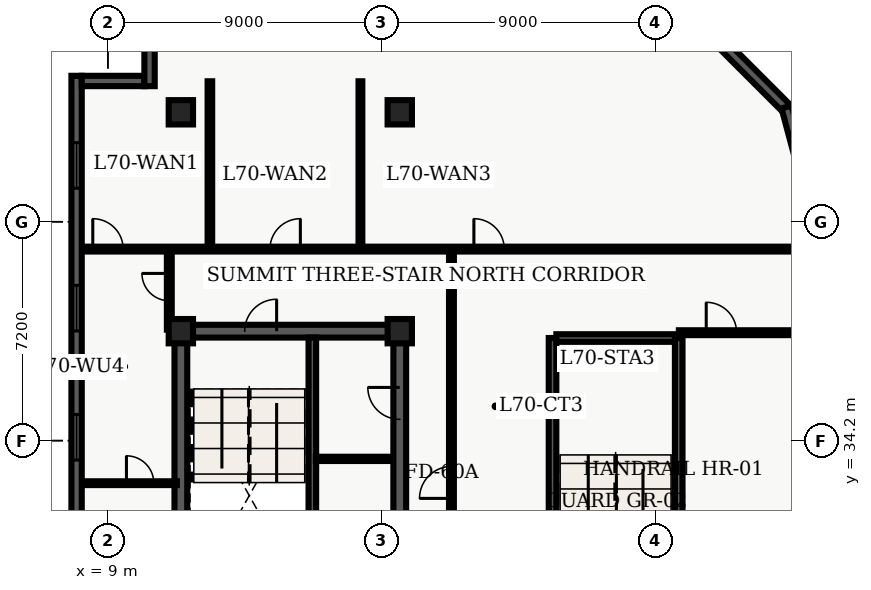
"""IFC4 building model, lengths in metres.
Left out: names, types, materials, properties, quantities, classifications, styles, units other than length and angle.
Written with IfcOpenShell. Run it as: python <this file> out.ifc"""

import sys

from ifc_helpers import new_model, entity, si_unit, converted_unit, direction, frame, origin_with_axes, origin_2d_with_axis, place, context, subcontext, project, spatial, polyline, rectangle, outline, extrude, element, fill, save


model = new_model("IFC4")
c1 = context("Model", 3, precision=1e-05, world=origin_with_axes(), true_north=direction((0.0, 1.0)))
c2 = subcontext(c1, "Body", "Model", "MODEL_VIEW")
j1 = project(units=[si_unit("LENGTHUNIT", "METRE"), converted_unit("PLANEANGLEUNIT", "DEGREE", entity("IfcPlaneAngleMeasure", 0.017), si_unit("PLANEANGLEUNIT", "RADIAN"), dimensions=[0, 0, 0, 0, 0, 0, 0])], contexts=[c1])
p1 = place(None, origin_with_axes())
s1 = spatial("IfcSite", under=j1, at=p1, CompositionType="ELEMENT")
p2 = place(p1, origin_with_axes())
s2 = spatial("IfcBuilding", under=s1, at=p2, CompositionType="ELEMENT")
p3 = place(p2, frame((0.0, 0.0, 284.1), z_axis=(0.0, 0.0, 1.0), x_axis=(1.0, 0.0, 0.0)))
s3 = spatial("IfcBuildingStorey", under=s2, at=p3, CompositionType="ELEMENT", Elevation=284.1)
p4 = place(p3, frame((11.4, 10.8, 0.0), z_axis=(0.0, 0.0, 1.0), x_axis=(0.0, 1.0, 0.0)))
e1 = element("IfcWall", 1, at=p4, inside=s3, PredefinedType="SHEAR", context=c2, shape_type="SweptSolid", body=[
    extrude(outline(polyline([(0.0, -0.21), (27.0, -0.21), (27.0, 0.21), (0.0, 0.21), (0.0, -0.21)])), origin_with_axes(), (0.0, 0.0, 1.0), 3.6),
])
p5 = place(p3, frame((11.4, 37.8, 0.0), z_axis=(0.0, 0.0, 1.0), x_axis=(1.0, 0.0, 0.0)))
e2 = element("IfcWall", 2, at=p5, inside=s3, PredefinedType="SHEAR", context=c2, shape_type="SweptSolid", body=[
    extrude(outline(polyline([(0.0, -0.21), (7.2, -0.21), (7.2, 0.21), (0.0, 0.21), (0.0, -0.21)])), origin_with_axes(), (0.0, 0.0, 1.0), 3.6),
])
p6 = place(p5, frame((2.625, 0.0, 0.0), z_axis=(0.0, 0.0, 1.0), x_axis=(1.0, 0.0, 0.0)))
e3 = element("IfcOpeningElement", 3, at=p6, cuts=e2, PredefinedType="OPENING", context=c2, shape_type="SweptSolid", body=[
    extrude(rectangle(XDim=1.05, YDim=0.44, at=origin_2d_with_axis()), origin_with_axes(), (0.0, 0.0, 1.0), 2.15),
])
p7 = place(p3, frame((18.6, 24.3, 0.0), z_axis=(0.0, 0.0, 1.0), x_axis=(0.0, 1.0, 0.0)))
e4 = element("IfcWall", 4, at=p7, inside=s3, PredefinedType="SHEAR", context=c2, shape_type="SweptSolid", body=[
    extrude(outline(polyline([(0.0, -0.21), (13.5, -0.21), (13.5, 0.21), (0.0, 0.21), (0.0, -0.21)])), origin_with_axes(), (0.0, 0.0, 1.0), 3.6),
])
p8 = place(p7, frame((6.725, 0.0, 0.0), z_axis=(0.0, 0.0, 1.0), x_axis=(1.0, 0.0, 0.0)))
e5 = element("IfcOpeningElement", 5, at=p8, cuts=e4, PredefinedType="OPENING", context=c2, shape_type="SweptSolid", body=[
    extrude(rectangle(XDim=1.05, YDim=0.44, at=origin_2d_with_axis()), origin_with_axes(), (0.0, 0.0, 1.0), 2.15),
])
p9 = place(p7, frame((11.125, 0.0, 0.0), z_axis=(0.0, 0.0, 1.0), x_axis=(1.0, 0.0, 0.0)))
e6 = element("IfcOpeningElement", 6, at=p9, cuts=e4, PredefinedType="OPENING", context=c2, shape_type="SweptSolid", body=[
    extrude(rectangle(XDim=1.05, YDim=0.44, at=origin_2d_with_axis()), origin_with_axes(), (0.0, 0.0, 1.0), 2.15),
])
p10 = place(p3, frame((15.725, 28.9, 0.0), z_axis=(0.0, 0.0, 1.0), x_axis=(0.0, 1.0, 0.0)))
e7 = element("IfcWall", 7, at=p10, inside=s3, PredefinedType="SHEAR", context=c2, shape_type="SweptSolid", body=[
    extrude(outline(polyline([(0.0, -0.125), (8.69, -0.125), (8.69, 0.125), (0.0, 0.125), (0.0, -0.125)])), origin_with_axes(), (0.0, 0.0, 1.0), 3.6),
])
p11 = place(p3, frame((23.625, 28.925, 0.0), z_axis=(0.0, 0.0, 1.0), x_axis=(0.0, 1.0, 0.0)))
e8 = element("IfcWall", 8, at=p11, inside=s3, PredefinedType="SHEAR", context=c2, shape_type="SweptSolid", body=[
    extrude(outline(polyline([(0.0, -0.125), (8.65, -0.125), (8.65, 0.125), (0.0, 0.125), (0.0, -0.125)])), origin_with_axes(), (0.0, 0.0, 1.0), 3.6),
])
p12 = place(p11, frame((0.975, 0.0, 0.0), z_axis=(0.0, 0.0, 1.0), x_axis=(1.0, 0.0, 0.0)))
e9 = element("IfcOpeningElement", 9, at=p12, cuts=e8, PredefinedType="OPENING", context=c2, shape_type="SweptSolid", body=[
    extrude(rectangle(XDim=1.05, YDim=0.27, at=origin_2d_with_axis()), origin_with_axes(), (0.0, 0.0, 1.0), 2.15),
])
p13 = place(p3, frame((27.775, 28.925, 0.0), z_axis=(0.0, 0.0, 1.0), x_axis=(0.0, 1.0, 0.0)))
e10 = element("IfcWall", 10, at=p13, inside=s3, PredefinedType="SHEAR", context=c2, shape_type="SweptSolid", body=[
    extrude(outline(polyline([(0.0, -0.125), (8.65, -0.125), (8.65, 0.125), (0.0, 0.125), (0.0, -0.125)])), origin_with_axes(), (0.0, 0.0, 1.0), 3.6),
])
p14 = place(p3, frame((23.75, 37.575, 0.0), z_axis=(0.0, 0.0, 1.0), x_axis=(1.0, 0.0, 0.0)))
e11 = element("IfcWall", 11, at=p14, inside=s3, PredefinedType="SHEAR", context=c2, shape_type="SweptSolid", body=[
    extrude(outline(polyline([(0.0, -0.125), (3.9, -0.125), (3.9, 0.125), (0.0, 0.125), (0.0, -0.125)])), origin_with_axes(), (0.0, 0.0, 1.0), 3.6),
])
for number, where, z_axis, x_axis in (
    (12, (11.4, 37.8, 0.0), (0.0, 0.0, 1.0), (1.0, 0.0, 0.0)),
    (13, (11.4, 45.0, 0.0), (0.0, 0.0, 1.0), (1.0, 0.0, 0.0)),
    (14, (18.6, 37.8, 0.0), (0.0, 0.0, 1.0), (1.0, 0.0, 0.0)),
    (15, (18.6, 45.0, 0.0), (0.0, 0.0, 1.0), (1.0, 0.0, 0.0)),
):
    element("IfcColumn", number, at=place(p3, frame(where, z_axis=z_axis, x_axis=x_axis)), inside=s3, PredefinedType="COLUMN", context=c2, shape_type="SweptSolid", body=[
        extrude(rectangle(XDim=0.8, YDim=0.8, at=origin_2d_with_axis()), origin_with_axes(), (0.0, 0.0, 1.0), 3.9),
    ])
p15 = place(p3, frame((15.84, 33.6, 0.0), z_axis=(0.0, 0.0, 1.0), x_axis=(1.0, 0.0, 0.0)))
e16 = element("IfcWall", 16, at=p15, inside=s3, PredefinedType="PARTITIONING", context=c2, shape_type="SweptSolid", body=[
    extrude(outline(polyline([(0.0, -0.07), (2.46, -0.07), (2.46, 0.07), (0.0, 0.07), (0.0, -0.07)])), origin_with_axes(), (0.0, 0.0, 1.0), 2.64),
])
p16 = place(p3, frame((8.135, 40.5, 0.0), z_axis=(0.0, 0.0, 1.0), x_axis=(1.0, 0.0, 0.0)))
e17 = element("IfcWall", 17, at=p16, inside=s3, PredefinedType="PARTITIONING", context=c2, shape_type="SweptSolid", body=[
    extrude(outline(polyline([(0.0, -0.08), (23.93, -0.08), (23.93, 0.08), (0.0, 0.08), (0.0, -0.08)])), origin_with_axes(), (0.0, 0.0, 1.0), 2.64),
])
p17 = place(p16, frame((0.868, 0.0, 0.0), z_axis=(0.0, 0.0, 1.0), x_axis=(1.0, 0.0, 0.0)))
e18 = element("IfcOpeningElement", 18, at=p17, cuts=e17, PredefinedType="OPENING", context=c2, shape_type="SweptSolid", body=[
    extrude(rectangle(XDim=1.0, YDim=0.18, at=origin_2d_with_axis()), origin_with_axes(), (0.0, 0.0, 1.0), 2.15),
])
p18 = place(p16, frame((6.696, 0.0, 0.0), z_axis=(0.0, 0.0, 1.0), x_axis=(1.0, 0.0, 0.0)))
e19 = element("IfcOpeningElement", 19, at=p18, cuts=e17, PredefinedType="OPENING", context=c2, shape_type="SweptSolid", body=[
    extrude(rectangle(XDim=1.0, YDim=0.18, at=origin_2d_with_axis()), origin_with_axes(), (0.0, 0.0, 1.0), 2.15),
])
p19 = place(p16, frame((13.403, 0.0, 0.0), z_axis=(0.0, 0.0, 1.0), x_axis=(1.0, 0.0, 0.0)))
e20 = element("IfcOpeningElement", 20, at=p19, cuts=e17, PredefinedType="OPENING", context=c2, shape_type="SweptSolid", body=[
    extrude(rectangle(XDim=1.0, YDim=0.18, at=origin_2d_with_axis()), origin_with_axes(), (0.0, 0.0, 1.0), 2.15),
])
p20 = place(p3, frame((20.3, 7.8, 0.0), z_axis=(0.0, 0.0, 1.0), x_axis=(0.0, 1.0, 0.0)))
e21 = element("IfcWall", 21, at=p20, inside=s3, PredefinedType="PARTITIONING", context=c2, shape_type="SweptSolid", body=[
    extrude(outline(polyline([(0.0, -0.08), (32.7, -0.08), (32.7, 0.08), (0.0, 0.08), (0.0, -0.08)])), origin_with_axes(), (0.0, 0.0, 1.0), 2.64),
])
p21 = place(p20, frame((25.025, 0.0, 0.0), z_axis=(0.0, 0.0, 1.0), x_axis=(1.0, 0.0, 0.0)))
e22 = element("IfcOpeningElement", 22, at=p21, cuts=e21, PredefinedType="OPENING", context=c2, shape_type="SweptSolid", body=[
    extrude(rectangle(XDim=1.05, YDim=0.18, at=origin_2d_with_axis()), origin_with_axes(), (0.0, 0.0, 1.0), 2.15),
])
p22 = place(p20, frame((14.273, 0.0, 0.0), z_axis=(0.0, 0.0, 1.0), x_axis=(1.0, 0.0, 0.0)))
e23 = element("IfcOpeningElement", 23, at=p22, cuts=e21, PredefinedType="OPENING", context=c2, shape_type="SweptSolid", body=[
    extrude(rectangle(XDim=1.0, YDim=0.18, at=origin_2d_with_axis()), origin_with_axes(), (0.0, 0.0, 1.0), 2.15),
])
p23 = place(p20, frame((18.447, 0.0, 0.0), z_axis=(0.0, 0.0, 1.0), x_axis=(1.0, 0.0, 0.0)))
e24 = element("IfcOpeningElement", 24, at=p23, cuts=e21, PredefinedType="OPENING", context=c2, shape_type="SweptSolid", body=[
    extrude(rectangle(XDim=1.0, YDim=0.18, at=origin_2d_with_axis()), origin_with_axes(), (0.0, 0.0, 1.0), 2.15),
])
p24 = place(p20, frame((6.675, 0.0, 0.0), z_axis=(0.0, 0.0, 1.0), x_axis=(1.0, 0.0, 0.0)))
e25 = element("IfcOpeningElement", 25, at=p24, cuts=e21, PredefinedType="OPENING", context=c2, shape_type="SweptSolid", body=[
    extrude(rectangle(XDim=1.05, YDim=0.18, at=origin_2d_with_axis()), origin_with_axes(), (0.0, 0.0, 1.0), 2.15),
])
p25 = place(p3, frame((11.02, 37.85, 0.0), z_axis=(0.0, 0.0, 1.0), x_axis=(0.0, 1.0, 0.0)))
e26 = element("IfcWall", 26, at=p25, inside=s3, PredefinedType="PARTITIONING", context=c2, shape_type="SweptSolid", body=[
    extrude(outline(polyline([(0.0, -0.08), (2.65, -0.08), (2.65, 0.08), (0.0, 0.08), (0.0, -0.08)])), origin_with_axes(), (0.0, 0.0, 1.0), 2.64),
])
p26 = place(p25, frame((1.4, 0.0, 0.0), z_axis=(0.0, 0.0, 1.0), x_axis=(1.0, 0.0, 0.0)))
e27 = element("IfcOpeningElement", 27, at=p26, cuts=e26, PredefinedType="OPENING", context=c2, shape_type="SweptSolid", body=[
    extrude(rectangle(XDim=0.9, YDim=0.18, at=origin_2d_with_axis()), origin_with_axes(), (0.0, 0.0, 1.0), 2.15),
])
p27 = place(p3, frame((8.135, 32.8, 0.0), z_axis=(0.0, 0.0, 1.0), x_axis=(1.0, 0.0, 0.0)))
e28 = element("IfcWall", 28, at=p27, inside=s3, PredefinedType="PARTITIONING", context=c2, shape_type="SweptSolid", body=[
    extrude(outline(polyline([(0.0, -0.062), (3.135, -0.062), (3.135, 0.062), (0.0, 0.062), (0.0, -0.062)])), origin_with_axes(), (0.0, 0.0, 1.0), 2.64),
])
p28 = place(p27, frame((1.925, 0.0, 0.0), z_axis=(0.0, 0.0, 1.0), x_axis=(1.0, 0.0, 0.0)))
e29 = element("IfcOpeningElement", 29, at=p28, cuts=e28, PredefinedType="OPENING", context=c2, shape_type="SweptSolid", body=[
    extrude(rectangle(XDim=0.9, YDim=0.145, at=origin_2d_with_axis()), origin_with_axes(), (0.0, 0.0, 1.0), 2.15),
])
p29 = place(p3, frame((12.355, 40.6, 0.0), z_axis=(0.0, 0.0, 1.0), x_axis=(0.0, 1.0, 0.0)))
e30 = element("IfcWall", 30, at=p29, inside=s3, PredefinedType="PARTITIONING", context=c2, shape_type="SweptSolid", body=[
    extrude(outline(polyline([(0.0, -0.075), (5.42, -0.075), (5.42, 0.075), (0.0, 0.075), (0.0, -0.075)])), origin_with_axes(), (0.0, 0.0, 1.0), 2.64),
])
p30 = place(p3, frame((17.306, 40.6, 0.0), z_axis=(0.0, 0.0, 1.0), x_axis=(0.0, 1.0, 0.0)))
e31 = element("IfcWall", 31, at=p30, inside=s3, PredefinedType="PARTITIONING", context=c2, shape_type="SweptSolid", body=[
    extrude(outline(polyline([(0.0, -0.062), (5.42, -0.062), (5.42, 0.062), (0.0, 0.062), (0.0, -0.062)])), origin_with_axes(), (0.0, 0.0, 1.0), 2.64),
])
p31 = place(p3, frame((27.78, 37.75, 0.0), z_axis=(0.0, 0.0, 1.0), x_axis=(1.0, 0.0, 0.0)))
e32 = element("IfcWall", 32, at=p31, inside=s3, PredefinedType="PARTITIONING", context=c2, shape_type="SweptSolid", body=[
    extrude(outline(polyline([(0.0, -0.08), (6.06, -0.08), (6.06, 0.08), (0.0, 0.08), (0.0, -0.08)])), origin_with_axes(), (0.0, 0.0, 1.0), 2.64),
])
p32 = place(p31, frame((1.4, 0.0, 0.0), z_axis=(0.0, 0.0, 1.0), x_axis=(1.0, 0.0, 0.0)))
e33 = element("IfcOpeningElement", 33, at=p32, cuts=e32, PredefinedType="OPENING", context=c2, shape_type="SweptSolid", body=[
    extrude(rectangle(XDim=1.0, YDim=0.18, at=origin_2d_with_axis()), origin_with_axes(), (0.0, 0.0, 1.0), 2.15),
])
p33 = place(p3, frame((7.97, 2.74, 0.0), z_axis=(0.0, 0.0, 1.0), x_axis=(0.0, 1.0, 0.0)))
e34 = element("IfcWall", 34, at=p33, inside=s3, PredefinedType="SOLIDWALL", context=c2, shape_type="SweptSolid", body=[
    extrude(outline(polyline([(0.0, -0.17), (43.46, -0.17), (43.46, 0.17), (0.0, 0.17), (0.0, -0.17)])), origin_with_axes(), (0.0, 0.0, 1.0), 3.6),
])
p34 = place(p33, frame((2.948, 0.0, 0.45), z_axis=(0.0, 0.0, 1.0), x_axis=(1.0, 0.0, 0.0)))
e35 = element("IfcOpeningElement", 35, at=p34, cuts=e34, PredefinedType="OPENING", context=c2, shape_type="SweptSolid", body=[
    extrude(rectangle(XDim=1.5, YDim=0.36, at=origin_2d_with_axis()), origin_with_axes(), (0.0, 0.0, 1.0), 2.1),
])
p35 = place(p33, frame((7.643, 0.0, 0.45), z_axis=(0.0, 0.0, 1.0), x_axis=(1.0, 0.0, 0.0)))
e36 = element("IfcOpeningElement", 36, at=p35, cuts=e34, PredefinedType="OPENING", context=c2, shape_type="SweptSolid", body=[
    extrude(rectangle(XDim=1.5, YDim=0.36, at=origin_2d_with_axis()), origin_with_axes(), (0.0, 0.0, 1.0), 2.1),
])
p36 = place(p33, frame((17.034, 0.0, 0.45), z_axis=(0.0, 0.0, 1.0), x_axis=(1.0, 0.0, 0.0)))
e37 = element("IfcOpeningElement", 37, at=p36, cuts=e34, PredefinedType="OPENING", context=c2, shape_type="SweptSolid", body=[
    extrude(rectangle(XDim=1.5, YDim=0.36, at=origin_2d_with_axis()), origin_with_axes(), (0.0, 0.0, 1.0), 2.1),
])
p37 = place(p33, frame((26.426, 0.0, 0.45), z_axis=(0.0, 0.0, 1.0), x_axis=(1.0, 0.0, 0.0)))
e38 = element("IfcOpeningElement", 38, at=p37, cuts=e34, PredefinedType="OPENING", context=c2, shape_type="SweptSolid", body=[
    extrude(rectangle(XDim=1.5, YDim=0.36, at=origin_2d_with_axis()), origin_with_axes(), (0.0, 0.0, 1.0), 2.1),
])
p38 = place(p33, frame((31.571, 0.0, 0.45), z_axis=(0.0, 0.0, 1.0), x_axis=(1.0, 0.0, 0.0)))
e39 = element("IfcOpeningElement", 39, at=p38, cuts=e34, PredefinedType="OPENING", context=c2, shape_type="SweptSolid", body=[
    extrude(rectangle(XDim=1.5, YDim=0.36, at=origin_2d_with_axis()), origin_with_axes(), (0.0, 0.0, 1.0), 2.1),
])
p39 = place(p33, frame((35.817, 0.0, 0.45), z_axis=(0.0, 0.0, 1.0), x_axis=(1.0, 0.0, 0.0)))
e40 = element("IfcOpeningElement", 40, at=p39, cuts=e34, PredefinedType="OPENING", context=c2, shape_type="SweptSolid", body=[
    extrude(rectangle(XDim=1.5, YDim=0.36, at=origin_2d_with_axis()), origin_with_axes(), (0.0, 0.0, 1.0), 2.1),
])
p40 = place(p33, frame((40.512, 0.0, 0.45), z_axis=(0.0, 0.0, 1.0), x_axis=(1.0, 0.0, 0.0)))
e41 = element("IfcOpeningElement", 41, at=p40, cuts=e34, PredefinedType="OPENING", context=c2, shape_type="SweptSolid", body=[
    extrude(rectangle(XDim=1.5, YDim=0.36, at=origin_2d_with_axis()), origin_with_axes(), (0.0, 0.0, 1.0), 2.1),
])
p41 = place(p3, frame((8.14, 46.03, 0.0), z_axis=(0.0, 0.0, 1.0), x_axis=(1.0, 0.0, 0.0)))
e42 = element("IfcWall", 42, at=p41, inside=s3, PredefinedType="SOLIDWALL", context=c2, shape_type="SweptSolid", body=[
    extrude(outline(polyline([(0.0, -0.17), (2.06, -0.17), (2.06, 0.17), (0.0, 0.17), (0.0, -0.17)])), origin_with_axes(), (0.0, 0.0, 1.0), 3.6),
])
p42 = place(p3, frame((10.37, 45.86, 0.0), z_axis=(0.0, 0.0, 1.0), x_axis=(0.0, 1.0, 0.0)))
e43 = element("IfcWall", 43, at=p42, inside=s3, PredefinedType="SOLIDWALL", context=c2, shape_type="SweptSolid", body=[
    extrude(outline(polyline([(0.0, -0.17), (2.74, -0.17), (2.74, 0.17), (0.0, 0.17), (0.0, -0.17)])), origin_with_axes(), (0.0, 0.0, 1.0), 3.6),
])
p43 = place(p3, frame((28.866, 47.583, 0.0), z_axis=(0.0, 0.0, 1.0), x_axis=(0.707107, -0.707107, 0.0)))
e44 = element("IfcWall", 44, at=p43, inside=s3, PredefinedType="SOLIDWALL", context=c2, shape_type="SweptSolid", body=[
    extrude(outline(polyline([(0.0, -0.17), (3.54, -0.17), (3.54, 0.17), (0.0, 0.17), (0.0, -0.17)])), origin_with_axes(), (0.0, 0.0, 1.0), 3.6),
])
p44 = place(p3, frame((31.32, 45.175, 0.0), z_axis=(0.0, 0.0, 1.0), x_axis=(0.258788, -0.965934, 0.0)))
e45 = element("IfcWall", 45, at=p44, inside=s3, PredefinedType="SOLIDWALL", context=c2, shape_type="SweptSolid", body=[
    extrude(outline(polyline([(0.0, -0.17), (3.54, -0.17), (3.54, 0.17), (0.0, 0.17), (0.0, -0.17)])), origin_with_axes(), (0.0, 0.0, 1.0), 3.6),
])
p45 = place(p5, frame((2.625, 0.0, 0.0), z_axis=(0.0, 0.0, 1.0), x_axis=(1.0, 0.0, 0.0)))
e46 = element("IfcDoor", 46, at=p45, inside=s3, OperationType="SINGLE_SWING_RIGHT", PredefinedType="DOOR", context=c2, shape_type="SweptSolid", body=[
    extrude(rectangle(XDim=1.05, YDim=0.09, at=origin_2d_with_axis()), origin_with_axes(), (0.0, 0.0, 1.0), 2.15),
])
fill(e3, e46)
p46 = place(p7, frame((11.125, 0.0, 0.0), z_axis=(0.0, 0.0, 1.0), x_axis=(1.0, 0.0, 0.0)))
e47 = element("IfcDoor", 47, at=p46, inside=s3, OperationType="SINGLE_SWING_RIGHT", PredefinedType="DOOR", context=c2, shape_type="SweptSolid", body=[
    extrude(rectangle(XDim=1.05, YDim=0.09, at=origin_2d_with_axis()), origin_with_axes(), (0.0, 0.0, 1.0), 2.15),
])
fill(e6, e47)
p47 = place(p20, frame((25.025, 0.0, 0.0), z_axis=(0.0, 0.0, 1.0), x_axis=(1.0, 0.0, 0.0)))
e48 = element("IfcDoor", 48, at=p47, inside=s3, OperationType="SINGLE_SWING_LEFT", PredefinedType="DOOR", context=c2, shape_type="SweptSolid", body=[
    extrude(rectangle(XDim=1.05, YDim=0.09, at=origin_2d_with_axis()), origin_with_axes(), (0.0, 0.0, 1.0), 2.15),
])
fill(e22, e48)
p48 = place(p27, frame((1.925, 0.0, 0.0), z_axis=(0.0, 0.0, 1.0), x_axis=(1.0, 0.0, 0.0)))
e49 = element("IfcDoor", 49, at=p48, inside=s3, OperationType="SINGLE_SWING_LEFT", PredefinedType="DOOR", context=c2, shape_type="SweptSolid", body=[
    extrude(rectangle(XDim=0.9, YDim=0.075, at=origin_2d_with_axis()), origin_with_axes(), (0.0, 0.0, 1.0), 2.15),
])
fill(e29, e49)
p49 = place(p25, frame((1.4, 0.0, 0.0), z_axis=(0.0, 0.0, 1.0), x_axis=(1.0, 0.0, 0.0)))
e50 = element("IfcDoor", 50, at=p49, inside=s3, OperationType="SINGLE_SWING_RIGHT", PredefinedType="DOOR", context=c2, shape_type="SweptSolid", body=[
    extrude(rectangle(XDim=0.9, YDim=0.09, at=origin_2d_with_axis()), origin_with_axes(), (0.0, 0.0, 1.0), 2.15),
])
fill(e27, e50)
p50 = place(p16, frame((0.868, 0.0, 0.0), z_axis=(0.0, 0.0, 1.0), x_axis=(1.0, 0.0, 0.0)))
e51 = element("IfcDoor", 51, at=p50, inside=s3, OperationType="SINGLE_SWING_LEFT", PredefinedType="DOOR", context=c2, shape_type="SweptSolid", body=[
    extrude(rectangle(XDim=1.0, YDim=0.09, at=origin_2d_with_axis()), origin_with_axes(), (0.0, 0.0, 1.0), 2.15),
])
fill(e18, e51)
p51 = place(p16, frame((6.696, 0.0, 0.0), z_axis=(0.0, 0.0, 1.0), x_axis=(1.0, 0.0, 0.0)))
e52 = element("IfcDoor", 52, at=p51, inside=s3, OperationType="SINGLE_SWING_RIGHT", PredefinedType="DOOR", context=c2, shape_type="SweptSolid", body=[
    extrude(rectangle(XDim=1.0, YDim=0.09, at=origin_2d_with_axis()), origin_with_axes(), (0.0, 0.0, 1.0), 2.15),
])
fill(e19, e52)
p52 = place(p16, frame((13.403, 0.0, 0.0), z_axis=(0.0, 0.0, 1.0), x_axis=(1.0, 0.0, 0.0)))
e53 = element("IfcDoor", 53, at=p52, inside=s3, OperationType="SINGLE_SWING_LEFT", PredefinedType="DOOR", context=c2, shape_type="SweptSolid", body=[
    extrude(rectangle(XDim=1.0, YDim=0.09, at=origin_2d_with_axis()), origin_with_axes(), (0.0, 0.0, 1.0), 2.15),
])
fill(e20, e53)
p53 = place(p31, frame((1.4, 0.0, 0.0), z_axis=(0.0, 0.0, 1.0), x_axis=(1.0, 0.0, 0.0)))
e54 = element("IfcDoor", 54, at=p53, inside=s3, OperationType="SINGLE_SWING_LEFT", PredefinedType="DOOR", context=c2, shape_type="SweptSolid", body=[
    extrude(rectangle(XDim=1.0, YDim=0.09, at=origin_2d_with_axis()), origin_with_axes(), (0.0, 0.0, 1.0), 2.15),
])
fill(e33, e54)
p54 = place(p33, frame((31.571, 0.0, 0.45), z_axis=(0.0, 0.0, 1.0), x_axis=(1.0, 0.0, 0.0)))
e55 = element("IfcWindow", 55, at=p54, inside=s3, PredefinedType="WINDOW", context=c2, shape_type="SweptSolid", body=[
    extrude(rectangle(XDim=1.5, YDim=0.09, at=origin_2d_with_axis()), origin_with_axes(), (0.0, 0.0, 1.0), 2.1),
])
fill(e39, e55)
p55 = place(p33, frame((35.817, 0.0, 0.45), z_axis=(0.0, 0.0, 1.0), x_axis=(1.0, 0.0, 0.0)))
e56 = element("IfcWindow", 56, at=p55, inside=s3, PredefinedType="WINDOW", context=c2, shape_type="SweptSolid", body=[
    extrude(rectangle(XDim=1.5, YDim=0.09, at=origin_2d_with_axis()), origin_with_axes(), (0.0, 0.0, 1.0), 2.1),
])
fill(e40, e56)
p56 = place(p33, frame((40.512, 0.0, 0.45), z_axis=(0.0, 0.0, 1.0), x_axis=(1.0, 0.0, 0.0)))
e57 = element("IfcWindow", 57, at=p56, inside=s3, PredefinedType="WINDOW", context=c2, shape_type="SweptSolid", body=[
    extrude(rectangle(XDim=1.5, YDim=0.09, at=origin_2d_with_axis()), origin_with_axes(), (0.0, 0.0, 1.0), 2.1),
])
fill(e41, e57)
save(model, sys.argv[1])
